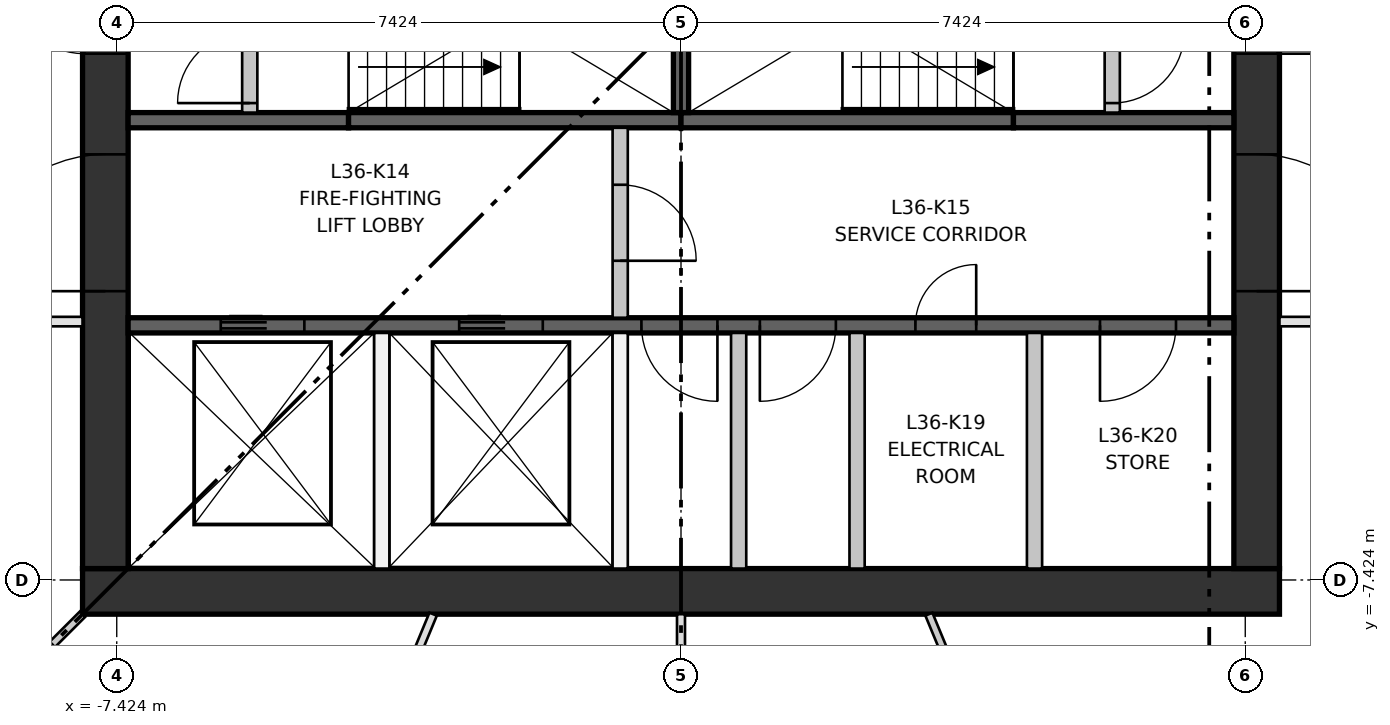
"""IFC4 building model, lengths in metres.
Left out: names, types, materials, properties, quantities, classifications, styles, units other than length and angle.
Written with IfcOpenShell. Run it as: python <this file> out.ifc"""

import sys

from ifc_helpers import new_model, si_unit, direction, frame, frame_2d, origin, place, context, subcontext, project, spatial, rectangle, extrude, element, fill, save


model = new_model("IFC4")
c1 = context("Model", 3, precision=1e-05, world=origin(), true_north=direction((0.0, 1.0)))
c2 = subcontext(c1, "Body", "Model", "MODEL_VIEW")
j1 = project(units=[si_unit("LENGTHUNIT", "METRE"), si_unit("PLANEANGLEUNIT", "RADIAN")], contexts=[c1])
p1 = place(None, origin())
s1 = spatial("IfcSite", under=j1, at=p1, CompositionType="ELEMENT")
p2 = place(p1, origin())
s2 = spatial("IfcBuilding", under=s1, at=p2, CompositionType="ELEMENT")
p3 = place(p2, frame((0.0, 0.0, 137.7)))
s3 = spatial("IfcBuildingStorey", under=s2, at=p3, CompositionType="ELEMENT", Elevation=137.7)
p4 = place(p3, frame((-7.874, -7.574, 0.0), z_axis=(0.0, 0.0, 1.0), x_axis=(1.0, 0.0, 0.0)))
e1 = element("IfcWall", 1, at=p4, inside=s3, PredefinedType="SHEAR", context=c2, shape_type="SweptSolid", body=[
    extrude(rectangle(XDim=15.748, YDim=0.6, at=frame_2d((7.874, 0.0))), origin(), (0.0, 0.0, 1.0), 3.35),
])
p5 = place(p3, frame((-7.574, -7.274, 0.0), z_axis=(0.0, 0.0, 1.0), x_axis=(0.0, 1.0, 0.0)))
e2 = element("IfcWall", 2, at=p5, inside=s3, PredefinedType="SHEAR", context=c2, shape_type="SweptSolid", body=[
    extrude(rectangle(XDim=14.548, YDim=0.6, at=frame_2d((7.274, 0.0))), origin(), (0.0, 0.0, 1.0), 3.35),
])
p6 = place(p5, frame((6.774, 0.0, 0.0)))
e3 = element("IfcOpeningElement", 3, at=p6, cuts=e2, PredefinedType="OPENING", context=c2, shape_type="SweptSolid", body=[
    extrude(rectangle(XDim=1.0, YDim=2.1, at=frame_2d((0.5, 1.05))), frame((0.0, 0.31, 0.0), z_axis=(0.0, -1.0, 0.0), x_axis=(1.0, 0.0, 0.0)), (0.0, 0.0, 1.0), 0.62),
])
p7 = place(p5, frame((3.649, 0.0, 0.0)))
e4 = element("IfcOpeningElement", 4, at=p7, cuts=e2, PredefinedType="OPENING", context=c2, shape_type="SweptSolid", body=[
    extrude(rectangle(XDim=1.8, YDim=2.1, at=frame_2d((0.9, 1.05))), frame((0.0, 0.31, 0.0), z_axis=(0.0, -1.0, 0.0), x_axis=(1.0, 0.0, 0.0)), (0.0, 0.0, 1.0), 0.62),
])
p8 = place(p5, frame((9.098, 0.0, 0.0)))
e5 = element("IfcOpeningElement", 5, at=p8, cuts=e2, PredefinedType="OPENING", context=c2, shape_type="SweptSolid", body=[
    extrude(rectangle(XDim=1.8, YDim=2.1, at=frame_2d((0.9, 1.05))), frame((0.0, 0.31, 0.0), z_axis=(0.0, -1.0, 0.0), x_axis=(1.0, 0.0, 0.0)), (0.0, 0.0, 1.0), 0.62),
])
p9 = place(p3, frame((7.574, -7.274, 0.0), z_axis=(0.0, 0.0, 1.0), x_axis=(0.0, 1.0, 0.0)))
e6 = element("IfcWall", 6, at=p9, inside=s3, PredefinedType="SHEAR", context=c2, shape_type="SweptSolid", body=[
    extrude(rectangle(XDim=14.548, YDim=0.6, at=frame_2d((7.274, 0.0))), origin(), (0.0, 0.0, 1.0), 3.35),
])
p10 = place(p9, frame((6.774, 0.0, 0.0)))
e7 = element("IfcOpeningElement", 7, at=p10, cuts=e6, PredefinedType="OPENING", context=c2, shape_type="SweptSolid", body=[
    extrude(rectangle(XDim=1.0, YDim=2.1, at=frame_2d((0.5, 1.05))), frame((0.0, 0.31, 0.0), z_axis=(0.0, -1.0, 0.0), x_axis=(1.0, 0.0, 0.0)), (0.0, 0.0, 1.0), 0.62),
])
p11 = place(p9, frame((3.649, 0.0, 0.0)))
e8 = element("IfcOpeningElement", 8, at=p11, cuts=e6, PredefinedType="OPENING", context=c2, shape_type="SweptSolid", body=[
    extrude(rectangle(XDim=1.8, YDim=2.1, at=frame_2d((0.9, 1.05))), frame((0.0, 0.31, 0.0), z_axis=(0.0, -1.0, 0.0), x_axis=(1.0, 0.0, 0.0)), (0.0, 0.0, 1.0), 0.62),
])
p12 = place(p9, frame((9.098, 0.0, 0.0)))
e9 = element("IfcOpeningElement", 9, at=p12, cuts=e6, PredefinedType="OPENING", context=c2, shape_type="SweptSolid", body=[
    extrude(rectangle(XDim=1.8, YDim=2.1, at=frame_2d((0.9, 1.05))), frame((0.0, 0.31, 0.0), z_axis=(0.0, -1.0, 0.0), x_axis=(1.0, 0.0, 0.0)), (0.0, 0.0, 1.0), 0.62),
])
p13 = place(p3, frame((-7.274, -4.074, 0.0), z_axis=(0.0, 0.0, 1.0), x_axis=(1.0, 0.0, 0.0)))
e10 = element("IfcWall", 10, at=p13, inside=s3, PredefinedType="SHEAR", context=c2, shape_type="SweptSolid", body=[
    extrude(rectangle(XDim=14.548, YDim=0.2, at=frame_2d((7.274, 0.0))), origin(), (0.0, 0.0, 1.0), 3.0),
])
p14 = place(p13, frame((1.219, 0.0, 0.0)))
e11 = element("IfcOpeningElement", 11, at=p14, cuts=e10, PredefinedType="OPENING", context=c2, shape_type="SweptSolid", body=[
    extrude(rectangle(XDim=1.1, YDim=2.1, at=frame_2d((0.55, 1.05))), frame((0.0, 0.11, 0.0), z_axis=(0.0, -1.0, 0.0), x_axis=(1.0, 0.0, 0.0)), (0.0, 0.0, 1.0), 0.22),
])
p15 = place(p13, frame((4.355, 0.0, 0.0)))
e12 = element("IfcOpeningElement", 12, at=p15, cuts=e10, PredefinedType="OPENING", context=c2, shape_type="SweptSolid", body=[
    extrude(rectangle(XDim=1.1, YDim=2.1, at=frame_2d((0.55, 1.05))), frame((0.0, 0.11, 0.0), z_axis=(0.0, -1.0, 0.0), x_axis=(1.0, 0.0, 0.0)), (0.0, 0.0, 1.0), 0.22),
])
p16 = place(p13, frame((6.753, 0.0, 0.0)))
e13 = element("IfcOpeningElement", 13, at=p16, cuts=e10, PredefinedType="OPENING", context=c2, shape_type="SweptSolid", body=[
    extrude(rectangle(XDim=1.0, YDim=2.1, at=frame_2d((0.5, 1.05))), frame((0.0, 0.11, 0.0), z_axis=(0.0, -1.0, 0.0), x_axis=(1.0, 0.0, 0.0)), (0.0, 0.0, 1.0), 0.22),
])
p17 = place(p13, frame((8.312, 0.0, 0.0)))
e14 = element("IfcOpeningElement", 14, at=p17, cuts=e10, PredefinedType="OPENING", context=c2, shape_type="SweptSolid", body=[
    extrude(rectangle(XDim=1.0, YDim=2.1, at=frame_2d((0.5, 1.05))), frame((0.0, 0.11, 0.0), z_axis=(0.0, -1.0, 0.0), x_axis=(1.0, 0.0, 0.0)), (0.0, 0.0, 1.0), 0.22),
])
p18 = place(p13, frame((10.358, 0.0, 0.0)))
e15 = element("IfcOpeningElement", 15, at=p18, cuts=e10, PredefinedType="OPENING", context=c2, shape_type="SweptSolid", body=[
    extrude(rectangle(XDim=0.8, YDim=2.1, at=frame_2d((0.4, 1.05))), frame((0.0, 0.11, 0.0), z_axis=(0.0, -1.0, 0.0), x_axis=(1.0, 0.0, 0.0)), (0.0, 0.0, 1.0), 0.22),
])
p19 = place(p13, frame((12.787, 0.0, 0.0)))
e16 = element("IfcOpeningElement", 16, at=p19, cuts=e10, PredefinedType="OPENING", context=c2, shape_type="SweptSolid", body=[
    extrude(rectangle(XDim=1.0, YDim=2.1, at=frame_2d((0.5, 1.05))), frame((0.0, 0.11, 0.0), z_axis=(0.0, -1.0, 0.0), x_axis=(1.0, 0.0, 0.0)), (0.0, 0.0, 1.0), 0.22),
])
p20 = place(p3, frame((-7.274, -1.375, 0.0), z_axis=(0.0, 0.0, 1.0), x_axis=(1.0, 0.0, 0.0)))
e17 = element("IfcWall", 17, at=p20, inside=s3, PredefinedType="SHEAR", context=c2, shape_type="SweptSolid", body=[
    extrude(rectangle(XDim=2.9, YDim=0.2, at=frame_2d((1.45, 0.0))), origin(), (0.0, 0.0, 1.0), 3.0),
])
for number, where, z_axis, x_axis in (
    (18, (-4.374, -1.375, 0.0), (0.0, 0.0, 1.0), (1.0, 0.0, 0.0)),
    (19, (0.0, -1.375, 0.0), (0.0, 0.0, 1.0), (1.0, 0.0, 0.0)),
):
    element("IfcWall", number, at=place(p3, frame(where, z_axis=z_axis, x_axis=x_axis)), inside=s3, PredefinedType="SHEAR", context=c2, shape_type="SweptSolid", body=[
        extrude(rectangle(XDim=4.374, YDim=0.2, at=frame_2d((2.187, 0.0))), origin(), (0.0, 0.0, 1.0), 3.0),
    ])
p21 = place(p3, frame((4.374, -1.375, 0.0), z_axis=(0.0, 0.0, 1.0), x_axis=(1.0, 0.0, 0.0)))
e20 = element("IfcWall", 20, at=p21, inside=s3, PredefinedType="SHEAR", context=c2, shape_type="SweptSolid", body=[
    extrude(rectangle(XDim=2.9, YDim=0.2, at=frame_2d((1.45, 0.0))), origin(), (0.0, 0.0, 1.0), 3.0),
])
p22 = place(p3, frame((0.0, -1.275, 0.0), z_axis=(0.0, 0.0, 1.0), x_axis=(0.0, 1.0, 0.0)))
e21 = element("IfcWall", 21, at=p22, inside=s3, PredefinedType="SHEAR", context=c2, shape_type="SweptSolid", body=[
    extrude(rectangle(XDim=2.55, YDim=0.2, at=frame_2d((1.275, 0.0))), origin(), (0.0, 0.0, 1.0), 3.0),
])
for number, where, z_axis, x_axis in (
    (22, (-3.937, -7.274, 0.0), (0.0, 0.0, 1.0), (0.0, 1.0, 0.0)),
    (23, (-0.8, -7.274, 0.0), (0.0, 0.0, 1.0), (0.0, 1.0, 0.0)),
):
    element("IfcWall", number, at=place(p3, frame(where, z_axis=z_axis, x_axis=x_axis)), inside=s3, PredefinedType="PARTITIONING", context=c2, shape_type="SweptSolid", body=[
        extrude(rectangle(XDim=3.1, YDim=0.2, at=frame_2d((1.55, 0.0))), origin(), (0.0, 0.0, 1.0), 3.0),
    ])
p23 = place(p3, frame((-0.8, -3.974, 0.0), z_axis=(0.0, 0.0, 1.0), x_axis=(0.0, 1.0, 0.0)))
e24 = element("IfcWall", 24, at=p23, inside=s3, PredefinedType="PARTITIONING", context=c2, shape_type="SweptSolid", body=[
    extrude(rectangle(XDim=2.499, YDim=0.2, at=frame_2d((1.25, 0.0))), origin(), (0.0, 0.0, 1.0), 3.0),
])
p24 = place(p23, frame((0.75, 0.0, 0.0)))
e25 = element("IfcOpeningElement", 25, at=p24, cuts=e24, PredefinedType="OPENING", context=c2, shape_type="SweptSolid", body=[
    extrude(rectangle(XDim=1.0, YDim=2.1, at=frame_2d((0.5, 1.05))), frame((0.0, 0.11, 0.0), z_axis=(0.0, -1.0, 0.0), x_axis=(1.0, 0.0, 0.0)), (0.0, 0.0, 1.0), 0.22),
])
for number, where, z_axis, x_axis in (
    (26, (0.758, -7.274, 0.0), (0.0, 0.0, 1.0), (0.0, 1.0, 0.0)),
    (27, (2.317, -7.274, 0.0), (0.0, 0.0, 1.0), (0.0, 1.0, 0.0)),
    (28, (4.651, -7.274, 0.0), (0.0, 0.0, 1.0), (0.0, 1.0, 0.0)),
):
    element("IfcWall", number, at=place(p3, frame(where, z_axis=z_axis, x_axis=x_axis)), inside=s3, PredefinedType="PARTITIONING", context=c2, shape_type="SweptSolid", body=[
        extrude(rectangle(XDim=3.1, YDim=0.2, at=frame_2d((1.55, 0.0))), origin(), (0.0, 0.0, 1.0), 3.0),
    ])
p25 = place(p3, frame((-5.674, -1.275, 0.0), z_axis=(0.0, 0.0, 1.0), x_axis=(0.0, 1.0, 0.0)))
e29 = element("IfcWall", 29, at=p25, inside=s3, PredefinedType="PARTITIONING", context=c2, shape_type="SweptSolid", body=[
    extrude(rectangle(XDim=2.55, YDim=0.2, at=frame_2d((1.275, 0.0))), origin(), (0.0, 0.0, 1.0), 3.0),
])
p26 = place(p25, frame((0.125, 0.0, 0.0)))
e30 = element("IfcOpeningElement", 30, at=p26, cuts=e29, PredefinedType="OPENING", context=c2, shape_type="SweptSolid", body=[
    extrude(rectangle(XDim=0.95, YDim=2.1, at=frame_2d((0.475, 1.05))), frame((0.0, 0.11, 0.0), z_axis=(0.0, -1.0, 0.0), x_axis=(1.0, 0.0, 0.0)), (0.0, 0.0, 1.0), 0.22),
])
p27 = place(p25, frame((1.475, 0.0, 0.0)))
e31 = element("IfcOpeningElement", 31, at=p27, cuts=e29, PredefinedType="OPENING", context=c2, shape_type="SweptSolid", body=[
    extrude(rectangle(XDim=0.95, YDim=2.1, at=frame_2d((0.475, 1.05))), frame((0.0, 0.11, 0.0), z_axis=(0.0, -1.0, 0.0), x_axis=(1.0, 0.0, 0.0)), (0.0, 0.0, 1.0), 0.22),
])
p28 = place(p3, frame((5.674, -1.275, 0.0), z_axis=(0.0, 0.0, 1.0), x_axis=(0.0, 1.0, 0.0)))
e32 = element("IfcWall", 32, at=p28, inside=s3, PredefinedType="PARTITIONING", context=c2, shape_type="SweptSolid", body=[
    extrude(rectangle(XDim=2.55, YDim=0.2, at=frame_2d((1.275, 0.0))), origin(), (0.0, 0.0, 1.0), 3.0),
])
p29 = place(p28, frame((0.125, 0.0, 0.0)))
e33 = element("IfcOpeningElement", 33, at=p29, cuts=e32, PredefinedType="OPENING", context=c2, shape_type="SweptSolid", body=[
    extrude(rectangle(XDim=0.95, YDim=2.1, at=frame_2d((0.475, 1.05))), frame((0.0, 0.11, 0.0), z_axis=(0.0, -1.0, 0.0), x_axis=(1.0, 0.0, 0.0)), (0.0, 0.0, 1.0), 0.22),
])
p30 = place(p28, frame((1.475, 0.0, 0.0)))
e34 = element("IfcOpeningElement", 34, at=p30, cuts=e32, PredefinedType="OPENING", context=c2, shape_type="SweptSolid", body=[
    extrude(rectangle(XDim=0.95, YDim=2.1, at=frame_2d((0.475, 1.05))), frame((0.0, 0.11, 0.0), z_axis=(0.0, -1.0, 0.0), x_axis=(1.0, 0.0, 0.0)), (0.0, 0.0, 1.0), 0.22),
])
p31 = place(p3, frame((12.857, -4.024, 0.0), z_axis=(0.0, 0.0, 1.0), x_axis=(-1.0, 0.0, 0.0)))
e35 = element("IfcWall", 35, at=p31, inside=s3, PredefinedType="PARTITIONING", context=c2, shape_type="SweptSolid", body=[
    extrude(rectangle(XDim=4.983, YDim=0.125, at=frame_2d((2.491, 0.0))), origin(), (0.0, 0.0, 1.0), 3.0),
])
p32 = place(p31, frame((1.6, 0.0, 0.0)))
e36 = element("IfcOpeningElement", 36, at=p32, cuts=e35, PredefinedType="OPENING", context=c2, shape_type="SweptSolid", body=[
    extrude(rectangle(XDim=1.8, YDim=2.1, at=frame_2d((0.9, 1.05))), frame((0.0, 0.073, 0.0), z_axis=(0.0, -1.0, 0.0), x_axis=(1.0, 0.0, 0.0)), (0.0, 0.0, 1.0), 0.145),
])
p33 = place(p3, frame((-7.874, -4.024, 0.0), z_axis=(0.0, 0.0, 1.0), x_axis=(-1.0, 0.0, 0.0)))
e37 = element("IfcWall", 37, at=p33, inside=s3, PredefinedType="PARTITIONING", context=c2, shape_type="SweptSolid", body=[
    extrude(rectangle(XDim=6.458, YDim=0.125, at=frame_2d((3.229, 0.0))), origin(), (0.0, 0.0, 1.0), 3.0),
])
p34 = place(p33, frame((2.7, 0.0, 0.0)))
e38 = element("IfcOpeningElement", 38, at=p34, cuts=e37, PredefinedType="OPENING", context=c2, shape_type="SweptSolid", body=[
    extrude(rectangle(XDim=1.0, YDim=2.1, at=frame_2d((0.5, 1.05))), frame((0.0, 0.073, 0.0), z_axis=(0.0, -1.0, 0.0), x_axis=(1.0, 0.0, 0.0)), (0.0, 0.0, 1.0), 0.145),
])
p35 = place(p3, frame((-7.874, -7.874, 0.0), z_axis=(0.0, 0.0, 1.0), x_axis=(-0.707106781187, -0.707106781187, 0.0)))
e39 = element("IfcWall", 39, at=p35, inside=s3, PredefinedType="PARTITIONING", context=c2, shape_type="SweptSolid", body=[
    extrude(rectangle(XDim=6.714, YDim=0.1, at=frame_2d((3.357, 0.0))), origin(), (0.0, 0.0, 1.0), 3.0),
])
p36 = place(p35, frame((2.7, 0.0, 0.0)))
e40 = element("IfcOpeningElement", 40, at=p36, cuts=e39, PredefinedType="OPENING", context=c2, shape_type="SweptSolid", body=[
    extrude(rectangle(XDim=1.0, YDim=2.1, at=frame_2d((0.5, 1.05))), frame((0.0, 0.06, 0.0), z_axis=(0.0, -1.0, 0.0), x_axis=(1.0, 0.0, 0.0)), (0.0, 0.0, 1.0), 0.12),
])
p37 = place(p3, frame((-3.261, -7.874, 0.0), z_axis=(0.0, 0.0, 1.0), x_axis=(-0.382681880818, -0.923880175181, 0.0)))
e41 = element("IfcWall", 41, at=p37, inside=s3, PredefinedType="PARTITIONING", context=c2, shape_type="SweptSolid", body=[
    extrude(rectangle(XDim=5.857, YDim=0.105, at=frame_2d((2.929, 0.0))), origin(), (0.0, 0.0, 1.0), 3.0),
])
p38 = place(p37, frame((2.4, 0.0, 0.0)))
e42 = element("IfcOpeningElement", 42, at=p38, cuts=e41, PredefinedType="OPENING", context=c2, shape_type="SweptSolid", body=[
    extrude(rectangle(XDim=1.0, YDim=2.1, at=frame_2d((0.5, 1.05))), frame((0.0, 0.062, 0.0), z_axis=(0.0, -1.0, 0.0), x_axis=(1.0, 0.0, 0.0)), (0.0, 0.0, 1.0), 0.125),
])
p39 = place(p3, frame((0.0, -7.874, 0.0), z_axis=(0.0, 0.0, 1.0), x_axis=(0.0, -1.0, 0.0)))
e43 = element("IfcWall", 43, at=p39, inside=s3, PredefinedType="PARTITIONING", context=c2, shape_type="SweptSolid", body=[
    extrude(rectangle(XDim=6.506, YDim=0.105, at=frame_2d((3.253, 0.0))), origin(), (0.0, 0.0, 1.0), 3.0),
])
p40 = place(p3, frame((5.503, -13.285, 0.0), z_axis=(0.0, 0.0, 1.0), x_axis=(-0.382681880818, 0.923880175181, 0.0)))
e44 = element("IfcWall", 44, at=p40, inside=s3, PredefinedType="PARTITIONING", context=c2, shape_type="SweptSolid", body=[
    extrude(rectangle(XDim=5.857, YDim=0.1, at=frame_2d((2.929, 0.0))), origin(), (0.0, 0.0, 1.0), 3.0),
])
p41 = place(p40, frame((2.4, 0.0, 0.0)))
e45 = element("IfcOpeningElement", 45, at=p41, cuts=e44, PredefinedType="OPENING", context=c2, shape_type="SweptSolid", body=[
    extrude(rectangle(XDim=1.0, YDim=2.1, at=frame_2d((0.5, 1.05))), frame((0.0, 0.06, 0.0), z_axis=(0.0, -1.0, 0.0), x_axis=(1.0, 0.0, 0.0)), (0.0, 0.0, 1.0), 0.12),
])
p42 = place(p14, origin())
e46 = element("IfcDoor", 46, at=p42, inside=s3, OperationType="DOUBLE_DOOR_SLIDING", PredefinedType="DOOR", context=c2, shape_type="SweptSolid", body=[
    extrude(rectangle(XDim=1.1, YDim=2.1, at=frame_2d((0.55, 1.05))), frame((0.0, 0.025, 0.0), z_axis=(0.0, -1.0, 0.0), x_axis=(1.0, 0.0, 0.0)), (0.0, 0.0, 1.0), 0.05),
])
fill(e11, e46)
p43 = place(p15, origin())
e47 = element("IfcDoor", 47, at=p43, inside=s3, OperationType="DOUBLE_DOOR_SLIDING", PredefinedType="DOOR", context=c2, shape_type="SweptSolid", body=[
    extrude(rectangle(XDim=1.1, YDim=2.1, at=frame_2d((0.55, 1.05))), frame((0.0, 0.025, 0.0), z_axis=(0.0, -1.0, 0.0), x_axis=(1.0, 0.0, 0.0)), (0.0, 0.0, 1.0), 0.05),
])
fill(e12, e47)
p44 = place(p26, origin())
e48 = element("IfcDoor", 48, at=p44, inside=s3, OperationType="SINGLE_SWING_LEFT", PredefinedType="DOOR", context=c2, shape_type="SweptSolid", body=[
    extrude(rectangle(XDim=0.95, YDim=2.1, at=frame_2d((0.475, 1.05))), frame((0.0, 0.025, 0.0), z_axis=(0.0, -1.0, 0.0), x_axis=(1.0, 0.0, 0.0)), (0.0, 0.0, 1.0), 0.05),
])
fill(e30, e48)
p45 = place(p29, frame((0.95, 0.0, 0.0), z_axis=(0.0, 0.0, 1.0), x_axis=(-1.0, 0.0, 0.0)))
e49 = element("IfcDoor", 49, at=p45, inside=s3, OperationType="SINGLE_SWING_RIGHT", PredefinedType="DOOR", context=c2, shape_type="SweptSolid", body=[
    extrude(rectangle(XDim=0.95, YDim=2.1, at=frame_2d((0.475, 1.05))), frame((0.0, 0.025, 0.0), z_axis=(0.0, -1.0, 0.0), x_axis=(1.0, 0.0, 0.0)), (0.0, 0.0, 1.0), 0.05),
])
fill(e33, e49)
p46 = place(p24, frame((1.0, 0.0, 0.0), z_axis=(0.0, 0.0, 1.0), x_axis=(-1.0, 0.0, 0.0)))
e50 = element("IfcDoor", 50, at=p46, inside=s3, OperationType="SINGLE_SWING_LEFT", PredefinedType="DOOR", context=c2, shape_type="SweptSolid", body=[
    extrude(rectangle(XDim=1.0, YDim=2.1, at=frame_2d((0.5, 1.05))), frame((0.0, 0.025, 0.0), z_axis=(0.0, -1.0, 0.0), x_axis=(1.0, 0.0, 0.0)), (0.0, 0.0, 1.0), 0.05),
])
fill(e25, e50)
p47 = place(p16, frame((1.0, 0.0, 0.0), z_axis=(0.0, 0.0, 1.0), x_axis=(-1.0, 0.0, 0.0)))
e51 = element("IfcDoor", 51, at=p47, inside=s3, OperationType="SINGLE_SWING_RIGHT", PredefinedType="DOOR", context=c2, shape_type="SweptSolid", body=[
    extrude(rectangle(XDim=1.0, YDim=2.1, at=frame_2d((0.5, 1.05))), frame((0.0, 0.025, 0.0), z_axis=(0.0, -1.0, 0.0), x_axis=(1.0, 0.0, 0.0)), (0.0, 0.0, 1.0), 0.05),
])
fill(e13, e51)
p48 = place(p17, frame((1.0, 0.0, 0.0), z_axis=(0.0, 0.0, 1.0), x_axis=(-1.0, 0.0, 0.0)))
e52 = element("IfcDoor", 52, at=p48, inside=s3, OperationType="SINGLE_SWING_LEFT", PredefinedType="DOOR", context=c2, shape_type="SweptSolid", body=[
    extrude(rectangle(XDim=1.0, YDim=2.1, at=frame_2d((0.5, 1.05))), frame((0.0, 0.025, 0.0), z_axis=(0.0, -1.0, 0.0), x_axis=(1.0, 0.0, 0.0)), (0.0, 0.0, 1.0), 0.05),
])
fill(e14, e52)
p49 = place(p18, origin())
e53 = element("IfcDoor", 53, at=p49, inside=s3, OperationType="SINGLE_SWING_RIGHT", PredefinedType="DOOR", context=c2, shape_type="SweptSolid", body=[
    extrude(rectangle(XDim=0.8, YDim=2.1, at=frame_2d((0.4, 1.05))), frame((0.0, 0.025, 0.0), z_axis=(0.0, -1.0, 0.0), x_axis=(1.0, 0.0, 0.0)), (0.0, 0.0, 1.0), 0.05),
])
fill(e15, e53)
p50 = place(p19, frame((1.0, 0.0, 0.0), z_axis=(0.0, 0.0, 1.0), x_axis=(-1.0, 0.0, 0.0)))
e54 = element("IfcDoor", 54, at=p50, inside=s3, OperationType="SINGLE_SWING_LEFT", PredefinedType="DOOR", context=c2, shape_type="SweptSolid", body=[
    extrude(rectangle(XDim=1.0, YDim=2.1, at=frame_2d((0.5, 1.05))), frame((0.0, 0.025, 0.0), z_axis=(0.0, -1.0, 0.0), x_axis=(1.0, 0.0, 0.0)), (0.0, 0.0, 1.0), 0.05),
])
fill(e16, e54)
p51 = place(p6, origin())
e55 = element("IfcDoor", 55, at=p51, inside=s3, OperationType="SINGLE_SWING_RIGHT", PredefinedType="DOOR", context=c2, shape_type="SweptSolid", body=[
    extrude(rectangle(XDim=1.0, YDim=2.1, at=frame_2d((0.5, 1.05))), frame((0.0, 0.3, 0.0), z_axis=(0.0, -1.0, 0.0), x_axis=(1.0, 0.0, 0.0)), (0.0, 0.0, 1.0), 0.05),
])
fill(e3, e55)
p52 = place(p7, origin())
e56 = element("IfcDoor", 56, at=p52, inside=s3, OperationType="DOUBLE_DOOR_SINGLE_SWING", PredefinedType="DOOR", context=c2, shape_type="SweptSolid", body=[
    extrude(rectangle(XDim=1.8, YDim=2.1, at=frame_2d((0.9, 1.05))), frame((0.0, 0.025, 0.0), z_axis=(0.0, -1.0, 0.0), x_axis=(1.0, 0.0, 0.0)), (0.0, 0.0, 1.0), 0.05),
])
fill(e4, e56)
p53 = place(p10, frame((1.0, 0.0, 0.0), z_axis=(0.0, 0.0, 1.0), x_axis=(-1.0, 0.0, 0.0)))
e57 = element("IfcDoor", 57, at=p53, inside=s3, OperationType="SINGLE_SWING_LEFT", PredefinedType="DOOR", context=c2, shape_type="SweptSolid", body=[
    extrude(rectangle(XDim=1.0, YDim=2.1, at=frame_2d((0.5, 1.05))), frame((0.0, 0.3, 0.0), z_axis=(0.0, -1.0, 0.0), x_axis=(1.0, 0.0, 0.0)), (0.0, 0.0, 1.0), 0.05),
])
fill(e7, e57)
p54 = place(p11, frame((1.8, 0.0, 0.0), z_axis=(0.0, 0.0, 1.0), x_axis=(-1.0, 0.0, 0.0)))
e58 = element("IfcDoor", 58, at=p54, inside=s3, OperationType="DOUBLE_DOOR_SINGLE_SWING", PredefinedType="DOOR", context=c2, shape_type="SweptSolid", body=[
    extrude(rectangle(XDim=1.8, YDim=2.1, at=frame_2d((0.9, 1.05))), frame((0.0, 0.025, 0.0), z_axis=(0.0, -1.0, 0.0), x_axis=(1.0, 0.0, 0.0)), (0.0, 0.0, 1.0), 0.05),
])
fill(e8, e58)
save(model, sys.argv[1])
